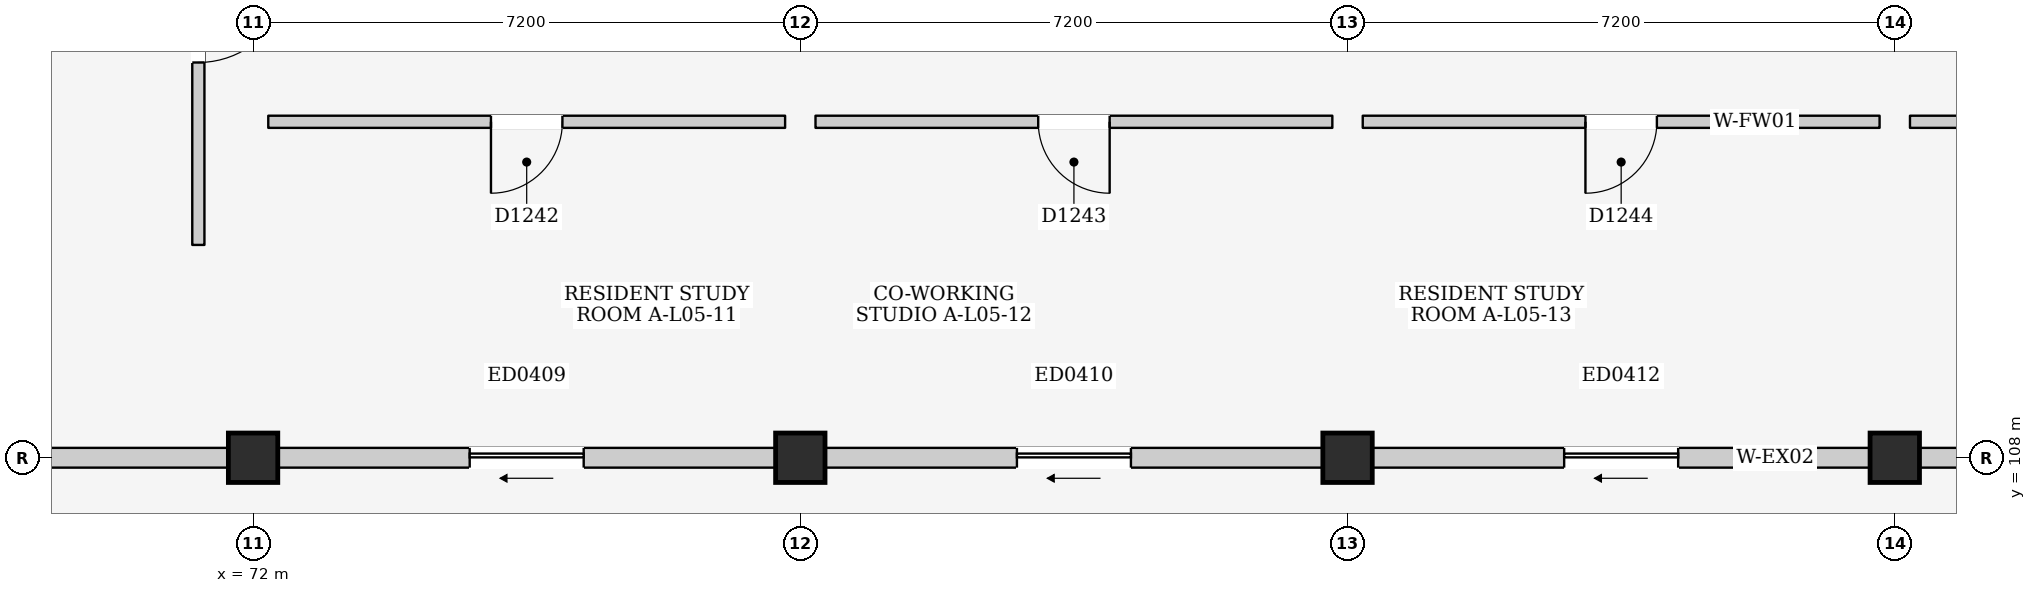
"""IFC4 building model, lengths in metres.
Left out: names, types, materials, properties, quantities, classifications, styles, units other than length and angle.
Written with IfcOpenShell. Run it as: python <this file> out.ifc"""

import sys

from ifc_helpers import new_model, si_unit, direction, frame, frame_2d, origin, origin_2d, place, context, subcontext, project, spatial, rectangle, extrude, element, fill, save


model = new_model("IFC4")
c1 = context("Model", 3, precision=1e-05, world=origin(), true_north=direction((0.0, 1.0)))
c2 = subcontext(c1, "Body", "Model", "MODEL_VIEW")
j1 = project(units=[si_unit("LENGTHUNIT", "METRE"), si_unit("PLANEANGLEUNIT", "RADIAN")], contexts=[c1])
p1 = place(None, origin())
s1 = spatial("IfcSite", under=j1, at=p1, CompositionType="ELEMENT")
p2 = place(p1, origin())
s2 = spatial("IfcBuilding", under=s1, at=p2, CompositionType="ELEMENT")
p3 = place(p2, frame((0.0, 0.0, 18.6)))
s3 = spatial("IfcBuildingStorey", under=s2, at=p3, CompositionType="ELEMENT", Elevation=18.6)
for number, where, z_axis, x_axis in (
    (1, (72.0, 108.0, 0.0), (0.0, 0.0, 1.0), (1.0, 0.0, 0.0)),
    (2, (79.2, 108.0, 0.0), (0.0, 0.0, 1.0), (1.0, 0.0, 0.0)),
    (3, (86.4, 108.0, 0.0), (0.0, 0.0, 1.0), (1.0, 0.0, 0.0)),
    (4, (93.6, 108.0, 0.0), (0.0, 0.0, 1.0), (1.0, 0.0, 0.0)),
):
    element("IfcColumn", number, at=place(p3, frame(where, z_axis=z_axis, x_axis=x_axis)), inside=s3, PredefinedType="COLUMN", context=c2, shape_type="SweptSolid", body=[
        extrude(rectangle(XDim=0.65, YDim=0.65, at=origin_2d()), origin(), (0.0, 0.0, 1.0), 3.3),
    ])
p4 = place(p3, frame((65.125, 108.0, 0.0), z_axis=(0.0, 0.0, 1.0), x_axis=(1.0, 0.0, 0.0)))
e5 = element("IfcWall", 5, at=p4, inside=s3, PredefinedType="ELEMENTEDWALL", context=c2, shape_type="SweptSolid", body=[
    extrude(rectangle(XDim=6.55, YDim=0.26, at=frame_2d((3.275, 0.0))), origin(), (0.0, 0.0, 1.0), 2.395),
])
p5 = place(p4, frame((2.775, 0.0, 1.2)))
e6 = element("IfcOpeningElement", 6, at=p5, cuts=e5, PredefinedType="OPENING", context=c2, shape_type="SweptSolid", body=[
    extrude(rectangle(XDim=1.0, YDim=0.9, at=frame_2d((0.5, 0.45))), frame((0.0, 0.145, 0.0), z_axis=(0.0, -1.0, 0.0), x_axis=(1.0, 0.0, 0.0)), (0.0, 0.0, 1.0), 0.29),
])
p6 = place(p3, frame((72.325, 108.0, 0.0), z_axis=(0.0, 0.0, 1.0), x_axis=(1.0, 0.0, 0.0)))
e7 = element("IfcWall", 7, at=p6, inside=s3, PredefinedType="ELEMENTEDWALL", context=c2, shape_type="SweptSolid", body=[
    extrude(rectangle(XDim=6.55, YDim=0.26, at=frame_2d((3.275, 0.0))), origin(), (0.0, 0.0, 1.0), 2.395),
])
p7 = place(p6, frame((2.525, 0.0, 0.0)))
e8 = element("IfcOpeningElement", 8, at=p7, cuts=e7, PredefinedType="OPENING", context=c2, shape_type="SweptSolid", body=[
    extrude(rectangle(XDim=1.5, YDim=2.12, at=frame_2d((0.75, 1.06))), frame((0.0, 0.145, 0.0), z_axis=(0.0, -1.0, 0.0), x_axis=(1.0, 0.0, 0.0)), (0.0, 0.0, 1.0), 0.29),
])
p8 = place(p3, frame((79.525, 108.0, 0.0), z_axis=(0.0, 0.0, 1.0), x_axis=(1.0, 0.0, 0.0)))
e9 = element("IfcWall", 9, at=p8, inside=s3, PredefinedType="ELEMENTEDWALL", context=c2, shape_type="SweptSolid", body=[
    extrude(rectangle(XDim=6.55, YDim=0.26, at=frame_2d((3.275, 0.0))), origin(), (0.0, 0.0, 1.0), 2.395),
])
p9 = place(p8, frame((2.525, 0.0, 0.0)))
e10 = element("IfcOpeningElement", 10, at=p9, cuts=e9, PredefinedType="OPENING", context=c2, shape_type="SweptSolid", body=[
    extrude(rectangle(XDim=1.5, YDim=2.12, at=frame_2d((0.75, 1.06))), frame((0.0, 0.145, 0.0), z_axis=(0.0, -1.0, 0.0), x_axis=(1.0, 0.0, 0.0)), (0.0, 0.0, 1.0), 0.29),
])
p10 = place(p3, frame((86.725, 108.0, 0.0), z_axis=(0.0, 0.0, 1.0), x_axis=(1.0, 0.0, 0.0)))
e11 = element("IfcWall", 11, at=p10, inside=s3, PredefinedType="ELEMENTEDWALL", context=c2, shape_type="SweptSolid", body=[
    extrude(rectangle(XDim=6.55, YDim=0.26, at=frame_2d((3.275, 0.0))), origin(), (0.0, 0.0, 1.0), 2.395),
])
p11 = place(p10, frame((2.525, 0.0, 0.0)))
e12 = element("IfcOpeningElement", 12, at=p11, cuts=e11, PredefinedType="OPENING", context=c2, shape_type="SweptSolid", body=[
    extrude(rectangle(XDim=1.5, YDim=2.12, at=frame_2d((0.75, 1.06))), frame((0.0, 0.145, 0.0), z_axis=(0.0, -1.0, 0.0), x_axis=(1.0, 0.0, 0.0)), (0.0, 0.0, 1.0), 0.29),
])
p12 = place(p3, frame((93.925, 108.0, 0.0), z_axis=(0.0, 0.0, 1.0), x_axis=(1.0, 0.0, 0.0)))
e13 = element("IfcWall", 13, at=p12, inside=s3, PredefinedType="ELEMENTEDWALL", context=c2, shape_type="SweptSolid", body=[
    extrude(rectangle(XDim=6.55, YDim=0.26, at=frame_2d((3.275, 0.0))), origin(), (0.0, 0.0, 1.0), 2.395),
])
p13 = place(p12, frame((2.525, 0.0, 0.0)))
e14 = element("IfcOpeningElement", 14, at=p13, cuts=e13, PredefinedType="OPENING", context=c2, shape_type="SweptSolid", body=[
    extrude(rectangle(XDim=1.5, YDim=2.12, at=frame_2d((0.75, 1.06))), frame((0.0, 0.145, 0.0), z_axis=(0.0, -1.0, 0.0), x_axis=(1.0, 0.0, 0.0)), (0.0, 0.0, 1.0), 0.29),
])
p14 = place(p3, frame((71.28, 110.8, 0.0), z_axis=(0.0, 0.0, 1.0), x_axis=(0.0, 1.0, 0.0)))
e15 = element("IfcWall", 15, at=p14, inside=s3, PredefinedType="PARTITIONING", context=c2, shape_type="SweptSolid", body=[
    extrude(rectangle(XDim=4.32, YDim=0.16, at=frame_2d((2.16, 0.0))), origin(), (0.0, 0.0, 1.0), 3.06),
])
p15 = place(p14, frame((2.4, 0.0, 0.0)))
e16 = element("IfcOpeningElement", 16, at=p15, cuts=e15, PredefinedType="OPENING", context=c2, shape_type="SweptSolid", body=[
    extrude(rectangle(XDim=1.2, YDim=2.2, at=frame_2d((0.6, 1.1))), frame((0.0, 0.095, 0.0), z_axis=(0.0, -1.0, 0.0), x_axis=(1.0, 0.0, 0.0)), (0.0, 0.0, 1.0), 0.19),
])
p16 = place(p3, frame((72.2, 112.42, 0.0), z_axis=(0.0, 0.0, 1.0), x_axis=(1.0, 0.0, 0.0)))
e17 = element("IfcWall", 17, at=p16, inside=s3, PredefinedType="PARTITIONING", context=c2, shape_type="SweptSolid", body=[
    extrude(rectangle(XDim=6.8, YDim=0.16, at=frame_2d((3.4, 0.0))), origin(), (0.0, 0.0, 1.0), 3.06),
])
p17 = place(p16, frame((2.93, 0.0, 0.0)))
e18 = element("IfcOpeningElement", 18, at=p17, cuts=e17, PredefinedType="OPENING", context=c2, shape_type="SweptSolid", body=[
    extrude(rectangle(XDim=0.94, YDim=2.12, at=frame_2d((0.47, 1.06))), frame((0.0, 0.095, 0.0), z_axis=(0.0, -1.0, 0.0), x_axis=(1.0, 0.0, 0.0)), (0.0, 0.0, 1.0), 0.19),
])
p18 = place(p3, frame((79.4, 112.42, 0.0), z_axis=(0.0, 0.0, 1.0), x_axis=(1.0, 0.0, 0.0)))
e19 = element("IfcWall", 19, at=p18, inside=s3, PredefinedType="PARTITIONING", context=c2, shape_type="SweptSolid", body=[
    extrude(rectangle(XDim=6.8, YDim=0.16, at=frame_2d((3.4, 0.0))), origin(), (0.0, 0.0, 1.0), 3.06),
])
p19 = place(p18, frame((2.93, 0.0, 0.0)))
e20 = element("IfcOpeningElement", 20, at=p19, cuts=e19, PredefinedType="OPENING", context=c2, shape_type="SweptSolid", body=[
    extrude(rectangle(XDim=0.94, YDim=2.12, at=frame_2d((0.47, 1.06))), frame((0.0, 0.095, 0.0), z_axis=(0.0, -1.0, 0.0), x_axis=(1.0, 0.0, 0.0)), (0.0, 0.0, 1.0), 0.19),
])
p20 = place(p3, frame((86.6, 112.42, 0.0), z_axis=(0.0, 0.0, 1.0), x_axis=(1.0, 0.0, 0.0)))
e21 = element("IfcWall", 21, at=p20, inside=s3, PredefinedType="PARTITIONING", context=c2, shape_type="SweptSolid", body=[
    extrude(rectangle(XDim=6.8, YDim=0.16, at=frame_2d((3.4, 0.0))), origin(), (0.0, 0.0, 1.0), 3.06),
])
p21 = place(p20, frame((2.93, 0.0, 0.0)))
e22 = element("IfcOpeningElement", 22, at=p21, cuts=e21, PredefinedType="OPENING", context=c2, shape_type="SweptSolid", body=[
    extrude(rectangle(XDim=0.94, YDim=2.12, at=frame_2d((0.47, 1.06))), frame((0.0, 0.095, 0.0), z_axis=(0.0, -1.0, 0.0), x_axis=(1.0, 0.0, 0.0)), (0.0, 0.0, 1.0), 0.19),
])
p22 = place(p3, frame((93.8, 112.42, 0.0), z_axis=(0.0, 0.0, 1.0), x_axis=(1.0, 0.0, 0.0)))
e23 = element("IfcWall", 23, at=p22, inside=s3, PredefinedType="PARTITIONING", context=c2, shape_type="SweptSolid", body=[
    extrude(rectangle(XDim=6.8, YDim=0.16, at=frame_2d((3.4, 0.0))), origin(), (0.0, 0.0, 1.0), 3.06),
])
p23 = place(p22, frame((2.93, 0.0, 0.0)))
e24 = element("IfcOpeningElement", 24, at=p23, cuts=e23, PredefinedType="OPENING", context=c2, shape_type="SweptSolid", body=[
    extrude(rectangle(XDim=0.94, YDim=2.12, at=frame_2d((0.47, 1.06))), frame((0.0, 0.095, 0.0), z_axis=(0.0, -1.0, 0.0), x_axis=(1.0, 0.0, 0.0)), (0.0, 0.0, 1.0), 0.19),
])
p24 = place(p7, frame((1.5, 0.0, 0.0), z_axis=(0.0, 0.0, 1.0), x_axis=(-1.0, 0.0, 0.0)))
e25 = element("IfcDoor", 25, at=p24, inside=s3, OperationType="SLIDING_TO_LEFT", PredefinedType="DOOR", context=c2, shape_type="SweptSolid", body=[
    extrude(rectangle(XDim=1.5, YDim=2.12, at=frame_2d((0.75, 1.06))), frame((0.0, 0.025, 0.0), z_axis=(0.0, -1.0, 0.0), x_axis=(1.0, 0.0, 0.0)), (0.0, 0.0, 1.0), 0.05),
])
fill(e8, e25)
p25 = place(p9, frame((1.5, 0.0, 0.0), z_axis=(0.0, 0.0, 1.0), x_axis=(-1.0, 0.0, 0.0)))
e26 = element("IfcDoor", 26, at=p25, inside=s3, OperationType="SLIDING_TO_LEFT", PredefinedType="DOOR", context=c2, shape_type="SweptSolid", body=[
    extrude(rectangle(XDim=1.5, YDim=2.12, at=frame_2d((0.75, 1.06))), frame((0.0, 0.025, 0.0), z_axis=(0.0, -1.0, 0.0), x_axis=(1.0, 0.0, 0.0)), (0.0, 0.0, 1.0), 0.05),
])
fill(e10, e26)
p26 = place(p11, frame((1.5, 0.0, 0.0), z_axis=(0.0, 0.0, 1.0), x_axis=(-1.0, 0.0, 0.0)))
e27 = element("IfcDoor", 27, at=p26, inside=s3, OperationType="SLIDING_TO_LEFT", PredefinedType="DOOR", context=c2, shape_type="SweptSolid", body=[
    extrude(rectangle(XDim=1.5, YDim=2.12, at=frame_2d((0.75, 1.06))), frame((0.0, 0.025, 0.0), z_axis=(0.0, -1.0, 0.0), x_axis=(1.0, 0.0, 0.0)), (0.0, 0.0, 1.0), 0.05),
])
fill(e12, e27)
p27 = place(p15, frame((1.2, 0.0, 0.0), z_axis=(0.0, 0.0, 1.0), x_axis=(-1.0, 0.0, 0.0)))
e28 = element("IfcDoor", 28, at=p27, inside=s3, OperationType="SINGLE_SWING_LEFT", PredefinedType="DOOR", context=c2, shape_type="SweptSolid", body=[
    extrude(rectangle(XDim=1.2, YDim=2.2, at=frame_2d((0.6, 1.1))), frame((0.0, 0.025, 0.0), z_axis=(0.0, -1.0, 0.0), x_axis=(1.0, 0.0, 0.0)), (0.0, 0.0, 1.0), 0.05),
])
fill(e16, e28)
p28 = place(p17, frame((0.94, 0.0, 0.0), z_axis=(0.0, 0.0, 1.0), x_axis=(-1.0, 0.0, 0.0)))
e29 = element("IfcDoor", 29, at=p28, inside=s3, OperationType="SINGLE_SWING_RIGHT", PredefinedType="DOOR", context=c2, shape_type="SweptSolid", body=[
    extrude(rectangle(XDim=0.94, YDim=2.12, at=frame_2d((0.47, 1.06))), frame((0.0, 0.025, 0.0), z_axis=(0.0, -1.0, 0.0), x_axis=(1.0, 0.0, 0.0)), (0.0, 0.0, 1.0), 0.05),
])
fill(e18, e29)
p29 = place(p19, frame((0.94, 0.0, 0.0), z_axis=(0.0, 0.0, 1.0), x_axis=(-1.0, 0.0, 0.0)))
e30 = element("IfcDoor", 30, at=p29, inside=s3, OperationType="SINGLE_SWING_LEFT", PredefinedType="DOOR", context=c2, shape_type="SweptSolid", body=[
    extrude(rectangle(XDim=0.94, YDim=2.12, at=frame_2d((0.47, 1.06))), frame((0.0, 0.025, 0.0), z_axis=(0.0, -1.0, 0.0), x_axis=(1.0, 0.0, 0.0)), (0.0, 0.0, 1.0), 0.05),
])
fill(e20, e30)
p30 = place(p21, frame((0.94, 0.0, 0.0), z_axis=(0.0, 0.0, 1.0), x_axis=(-1.0, 0.0, 0.0)))
e31 = element("IfcDoor", 31, at=p30, inside=s3, OperationType="SINGLE_SWING_RIGHT", PredefinedType="DOOR", context=c2, shape_type="SweptSolid", body=[
    extrude(rectangle(XDim=0.94, YDim=2.12, at=frame_2d((0.47, 1.06))), frame((0.0, 0.025, 0.0), z_axis=(0.0, -1.0, 0.0), x_axis=(1.0, 0.0, 0.0)), (0.0, 0.0, 1.0), 0.05),
])
fill(e22, e31)
save(model, sys.argv[1])
